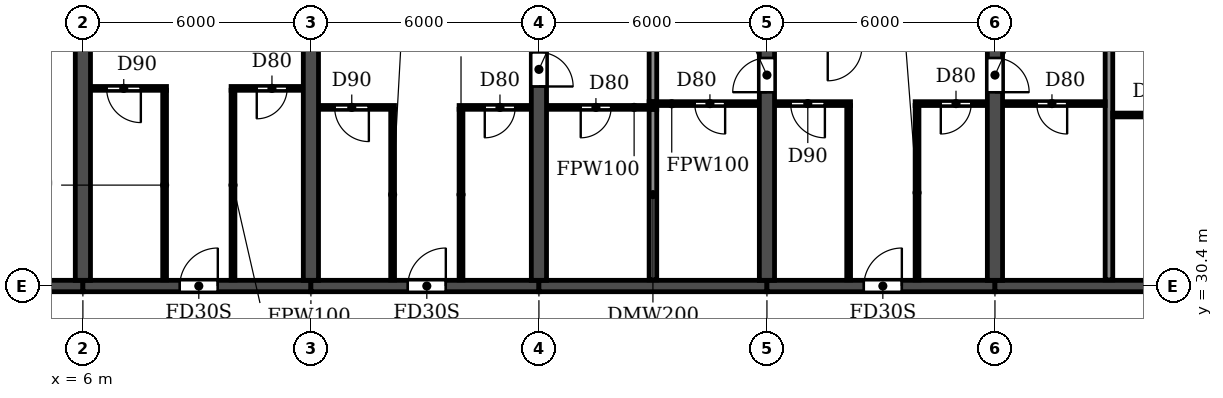
"""IFC4 building model, lengths in metres.
Left out: names, types, materials, properties, quantities, classifications, styles, units other than length and angle.
Written with IfcOpenShell. Run it as: python <this file> out.ifc"""

import sys

from ifc_helpers import new_model, si_unit, direction, frame, frame_2d, origin, place, context, subcontext, project, spatial, rectangle, extrude, element, fill, save


model = new_model("IFC4")
c1 = context("Model", 3, precision=1e-05, world=origin(), true_north=direction((0.0, 1.0)))
c2 = subcontext(c1, "Body", "Model", "MODEL_VIEW")
j1 = project(units=[si_unit("LENGTHUNIT", "METRE"), si_unit("PLANEANGLEUNIT", "RADIAN")], contexts=[c1])
p1 = place(None, origin())
s1 = spatial("IfcSite", under=j1, at=p1, CompositionType="ELEMENT")
p2 = place(p1, origin())
s2 = spatial("IfcBuilding", under=s1, at=p2, CompositionType="ELEMENT")
p3 = place(p2, frame((0.0, 0.0, 33.3)))
s3 = spatial("IfcBuildingStorey", under=s2, at=p3, CompositionType="ELEMENT", Elevation=33.3)
for number, where, z_axis, x_axis in (
    (1, (6.0, 30.55, 0.0), (0.0, 0.0, 1.0), (0.0, 1.0, 0.0)),
    (2, (12.0, 30.55, 0.0), (0.0, 0.0, 1.0), (0.0, 1.0, 0.0)),
):
    element("IfcWall", number, at=place(p3, frame(where, z_axis=z_axis, x_axis=x_axis)), inside=s3, PredefinedType="SHEAR", context=c2, shape_type="SweptSolid", body=[
        extrude(rectangle(XDim=14.05, YDim=0.4, at=frame_2d((7.025, 0.0))), origin(), (0.0, 0.0, 1.0), 3.05),
    ])
p4 = place(p3, frame((18.0, 30.55, 0.0), z_axis=(0.0, 0.0, 1.0), x_axis=(0.0, 1.0, 0.0)))
e3 = element("IfcWall", 3, at=p4, inside=s3, PredefinedType="SHEAR", context=c2, shape_type="SweptSolid", body=[
    extrude(rectangle(XDim=14.05, YDim=0.4, at=frame_2d((7.025, 0.0))), origin(), (0.0, 0.0, 1.0), 3.05),
])
p5 = place(p4, frame((5.1, 0.0, 0.0)))
e4 = element("IfcOpeningElement", 4, at=p5, cuts=e3, PredefinedType="OPENING", context=c2, shape_type="SweptSolid", body=[
    extrude(rectangle(XDim=0.9, YDim=2.1, at=frame_2d((0.45, 1.05))), frame((0.0, 0.21, 0.0), z_axis=(0.0, -1.0, 0.0), x_axis=(1.0, 0.0, 0.0)), (0.0, 0.0, 1.0), 0.42),
])
p6 = place(p3, frame((24.0, 30.55, 0.0), z_axis=(0.0, 0.0, 1.0), x_axis=(0.0, 1.0, 0.0)))
e5 = element("IfcWall", 5, at=p6, inside=s3, PredefinedType="SHEAR", context=c2, shape_type="SweptSolid", body=[
    extrude(rectangle(XDim=14.05, YDim=0.4, at=frame_2d((7.025, 0.0))), origin(), (0.0, 0.0, 1.0), 3.05),
])
p7 = place(p6, frame((4.95, 0.0, 0.0)))
e6 = element("IfcOpeningElement", 6, at=p7, cuts=e5, PredefinedType="OPENING", context=c2, shape_type="SweptSolid", body=[
    extrude(rectangle(XDim=0.9, YDim=2.1, at=frame_2d((0.45, 1.05))), frame((0.0, 0.21, 0.0), z_axis=(0.0, -1.0, 0.0), x_axis=(1.0, 0.0, 0.0)), (0.0, 0.0, 1.0), 0.42),
])
p8 = place(p3, frame((30.0, 30.55, 0.0), z_axis=(0.0, 0.0, 1.0), x_axis=(0.0, 1.0, 0.0)))
e7 = element("IfcWall", 7, at=p8, inside=s3, PredefinedType="SHEAR", context=c2, shape_type="SweptSolid", body=[
    extrude(rectangle(XDim=14.05, YDim=0.4, at=frame_2d((7.025, 0.0))), origin(), (0.0, 0.0, 1.0), 3.05),
])
p9 = place(p8, frame((4.95, 0.0, 0.0)))
e8 = element("IfcOpeningElement", 8, at=p9, cuts=e7, PredefinedType="OPENING", context=c2, shape_type="SweptSolid", body=[
    extrude(rectangle(XDim=0.9, YDim=2.1, at=frame_2d((0.45, 1.05))), frame((0.0, 0.21, 0.0), z_axis=(0.0, -1.0, 0.0), x_axis=(1.0, 0.0, 0.0)), (0.0, 0.0, 1.0), 0.42),
])
p10 = place(p3, frame((0.2, 30.4, 0.0), z_axis=(0.0, 0.0, 1.0), x_axis=(1.0, 0.0, 0.0)))
e9 = element("IfcWall", 9, at=p10, inside=s3, PredefinedType="SHEAR", context=c2, shape_type="SweptSolid", body=[
    extrude(rectangle(XDim=5.8, YDim=0.3, at=frame_2d((2.9, 0.0))), origin(), (0.0, 0.0, 1.0), 2.45),
])
p11 = place(p10, frame((2.3, 0.0, 0.0)))
e10 = element("IfcOpeningElement", 10, at=p11, cuts=e9, PredefinedType="OPENING", context=c2, shape_type="SweptSolid", body=[
    extrude(rectangle(XDim=1.0, YDim=2.1, at=frame_2d((0.5, 1.05))), frame((0.0, 0.16, 0.0), z_axis=(0.0, -1.0, 0.0), x_axis=(1.0, 0.0, 0.0)), (0.0, 0.0, 1.0), 0.32),
])
p12 = place(p3, frame((6.0, 30.4, 0.0), z_axis=(0.0, 0.0, 1.0), x_axis=(1.0, 0.0, 0.0)))
e11 = element("IfcWall", 11, at=p12, inside=s3, PredefinedType="SHEAR", context=c2, shape_type="SweptSolid", body=[
    extrude(rectangle(XDim=6.0, YDim=0.3, at=frame_2d((3.0, 0.0))), origin(), (0.0, 0.0, 1.0), 2.45),
])
p13 = place(p12, frame((2.55, 0.0, 0.0)))
e12 = element("IfcOpeningElement", 12, at=p13, cuts=e11, PredefinedType="OPENING", context=c2, shape_type="SweptSolid", body=[
    extrude(rectangle(XDim=1.0, YDim=2.1, at=frame_2d((0.5, 1.05))), frame((0.0, 0.16, 0.0), z_axis=(0.0, -1.0, 0.0), x_axis=(1.0, 0.0, 0.0)), (0.0, 0.0, 1.0), 0.32),
])
p14 = place(p3, frame((12.0, 30.4, 0.0), z_axis=(0.0, 0.0, 1.0), x_axis=(1.0, 0.0, 0.0)))
e13 = element("IfcWall", 13, at=p14, inside=s3, PredefinedType="SHEAR", context=c2, shape_type="SweptSolid", body=[
    extrude(rectangle(XDim=6.0, YDim=0.3, at=frame_2d((3.0, 0.0))), origin(), (0.0, 0.0, 1.0), 2.45),
])
p15 = place(p14, frame((2.55, 0.0, 0.0)))
e14 = element("IfcOpeningElement", 14, at=p15, cuts=e13, PredefinedType="OPENING", context=c2, shape_type="SweptSolid", body=[
    extrude(rectangle(XDim=1.0, YDim=2.1, at=frame_2d((0.5, 1.05))), frame((0.0, 0.16, 0.0), z_axis=(0.0, -1.0, 0.0), x_axis=(1.0, 0.0, 0.0)), (0.0, 0.0, 1.0), 0.32),
])
p16 = place(p3, frame((18.0, 30.4, 0.0), z_axis=(0.0, 0.0, 1.0), x_axis=(1.0, 0.0, 0.0)))
e15 = element("IfcWall", 15, at=p16, inside=s3, PredefinedType="SHEAR", context=c2, shape_type="SweptSolid", body=[
    extrude(rectangle(XDim=6.0, YDim=0.3, at=frame_2d((3.0, 0.0))), origin(), (0.0, 0.0, 1.0), 2.45),
])
p17 = place(p3, frame((24.0, 30.4, 0.0), z_axis=(0.0, 0.0, 1.0), x_axis=(1.0, 0.0, 0.0)))
e16 = element("IfcWall", 16, at=p17, inside=s3, PredefinedType="SHEAR", context=c2, shape_type="SweptSolid", body=[
    extrude(rectangle(XDim=6.0, YDim=0.3, at=frame_2d((3.0, 0.0))), origin(), (0.0, 0.0, 1.0), 2.45),
])
p18 = place(p17, frame((2.55, 0.0, 0.0)))
e17 = element("IfcOpeningElement", 17, at=p18, cuts=e16, PredefinedType="OPENING", context=c2, shape_type="SweptSolid", body=[
    extrude(rectangle(XDim=1.0, YDim=2.1, at=frame_2d((0.5, 1.05))), frame((0.0, 0.16, 0.0), z_axis=(0.0, -1.0, 0.0), x_axis=(1.0, 0.0, 0.0)), (0.0, 0.0, 1.0), 0.32),
])
p19 = place(p3, frame((30.0, 30.4, 0.0), z_axis=(0.0, 0.0, 1.0), x_axis=(1.0, 0.0, 0.0)))
e18 = element("IfcWall", 18, at=p19, inside=s3, PredefinedType="SHEAR", context=c2, shape_type="SweptSolid", body=[
    extrude(rectangle(XDim=6.0, YDim=0.3, at=frame_2d((3.0, 0.0))), origin(), (0.0, 0.0, 1.0), 2.45),
])
p20 = place(p3, frame((21.0, 30.56, 0.0), z_axis=(0.0, 0.0, 1.0), x_axis=(0.0, 1.0, 0.0)))
e19 = element("IfcWall", 19, at=p20, inside=s3, PredefinedType="PARTITIONING", context=c2, shape_type="SweptSolid", body=[
    extrude(rectangle(XDim=4.49, YDim=0.2, at=frame_2d((2.245, 0.0))), origin(), (0.0, 0.0, 1.0), 3.05),
])
p21 = place(p3, frame((21.0, 35.25, 0.0), z_axis=(0.0, 0.0, 1.0), x_axis=(0.0, 1.0, 0.0)))
e20 = element("IfcWall", 20, at=p21, inside=s3, PredefinedType="PARTITIONING", context=c2, shape_type="SweptSolid", body=[
    extrude(rectangle(XDim=9.49, YDim=0.2, at=frame_2d((4.745, 0.0))), origin(), (0.0, 0.0, 1.0), 3.05),
])
p22 = place(p3, frame((33.0, 30.56, 0.0), z_axis=(0.0, 0.0, 1.0), x_axis=(0.0, 1.0, 0.0)))
e21 = element("IfcWall", 21, at=p22, inside=s3, PredefinedType="PARTITIONING", context=c2, shape_type="SweptSolid", body=[
    extrude(rectangle(XDim=14.18, YDim=0.2, at=frame_2d((7.09, 0.0))), origin(), (0.0, 0.0, 1.0), 3.05),
])
p23 = place(p3, frame((33.1, 34.9, 0.0), z_axis=(0.0, 0.0, 1.0), x_axis=(1.0, 0.0, 0.0)))
e22 = element("IfcWall", 22, at=p23, inside=s3, PredefinedType="PARTITIONING", context=c2, shape_type="SweptSolid", body=[
    extrude(rectangle(XDim=2.69, YDim=0.1, at=frame_2d((1.345, 0.0))), origin(), (0.0, 0.0, 1.0), 3.05),
])
p24 = place(p23, frame((1.0, 0.0, 0.0)))
e23 = element("IfcOpeningElement", 23, at=p24, cuts=e22, PredefinedType="OPENING", context=c2, shape_type="SweptSolid", body=[
    extrude(rectangle(XDim=0.8, YDim=2.1, at=frame_2d((0.4, 1.05))), frame((0.0, 0.06, 0.0), z_axis=(0.0, -1.0, 0.0), x_axis=(1.0, 0.0, 0.0)), (0.0, 0.0, 1.0), 0.12),
])
p25 = place(p3, frame((12.21, 35.1, 0.0), z_axis=(0.0, 0.0, 1.0), x_axis=(1.0, 0.0, 0.0)))
e24 = element("IfcWall", 24, at=p25, inside=s3, PredefinedType="PARTITIONING", context=c2, shape_type="SweptSolid", body=[
    extrude(rectangle(XDim=1.99, YDim=0.1, at=frame_2d((0.995, 0.0))), origin(), (0.0, 0.0, 1.0), 3.05),
])
p26 = place(p25, frame((0.415, 0.0, 0.0)))
e25 = element("IfcOpeningElement", 25, at=p26, cuts=e24, PredefinedType="OPENING", context=c2, shape_type="SweptSolid", body=[
    extrude(rectangle(XDim=0.9, YDim=2.1, at=frame_2d((0.45, 1.05))), frame((0.0, 0.06, 0.0), z_axis=(0.0, -1.0, 0.0), x_axis=(1.0, 0.0, 0.0)), (0.0, 0.0, 1.0), 0.12),
])
p27 = place(p3, frame((15.9, 35.1, 0.0), z_axis=(0.0, 0.0, 1.0), x_axis=(1.0, 0.0, 0.0)))
e26 = element("IfcWall", 26, at=p27, inside=s3, PredefinedType="PARTITIONING", context=c2, shape_type="SweptSolid", body=[
    extrude(rectangle(XDim=1.89, YDim=0.1, at=frame_2d((0.945, 0.0))), origin(), (0.0, 0.0, 1.0), 3.05),
])
p28 = place(p27, frame((0.675, 0.0, 0.0)))
e27 = element("IfcOpeningElement", 27, at=p28, cuts=e26, PredefinedType="OPENING", context=c2, shape_type="SweptSolid", body=[
    extrude(rectangle(XDim=0.8, YDim=2.1, at=frame_2d((0.4, 1.05))), frame((0.0, 0.06, 0.0), z_axis=(0.0, -1.0, 0.0), x_axis=(1.0, 0.0, 0.0)), (0.0, 0.0, 1.0), 0.12),
])
p29 = place(p3, frame((18.21, 35.1, 0.0), z_axis=(0.0, 0.0, 1.0), x_axis=(1.0, 0.0, 0.0)))
e28 = element("IfcWall", 28, at=p29, inside=s3, PredefinedType="PARTITIONING", context=c2, shape_type="SweptSolid", body=[
    extrude(rectangle(XDim=2.89, YDim=0.1, at=frame_2d((1.445, 0.0))), origin(), (0.0, 0.0, 1.0), 3.05),
])
p30 = place(p29, frame((0.89, 0.0, 0.0)))
e29 = element("IfcOpeningElement", 29, at=p30, cuts=e28, PredefinedType="OPENING", context=c2, shape_type="SweptSolid", body=[
    extrude(rectangle(XDim=0.8, YDim=2.1, at=frame_2d((0.4, 1.05))), frame((0.0, 0.06, 0.0), z_axis=(0.0, -1.0, 0.0), x_axis=(1.0, 0.0, 0.0)), (0.0, 0.0, 1.0), 0.12),
])
p31 = place(p3, frame((20.9, 35.2, 0.0), z_axis=(0.0, 0.0, 1.0), x_axis=(1.0, 0.0, 0.0)))
e30 = element("IfcWall", 30, at=p31, inside=s3, PredefinedType="PARTITIONING", context=c2, shape_type="SweptSolid", body=[
    extrude(rectangle(XDim=2.89, YDim=0.1, at=frame_2d((1.445, 0.0))), origin(), (0.0, 0.0, 1.0), 3.05),
])
p32 = place(p31, frame((1.2, 0.0, 0.0)))
e31 = element("IfcOpeningElement", 31, at=p32, cuts=e30, PredefinedType="OPENING", context=c2, shape_type="SweptSolid", body=[
    extrude(rectangle(XDim=0.8, YDim=2.1, at=frame_2d((0.4, 1.05))), frame((0.0, 0.06, 0.0), z_axis=(0.0, -1.0, 0.0), x_axis=(1.0, 0.0, 0.0)), (0.0, 0.0, 1.0), 0.12),
])
p33 = place(p3, frame((24.21, 35.2, 0.0), z_axis=(0.0, 0.0, 1.0), x_axis=(1.0, 0.0, 0.0)))
e32 = element("IfcWall", 32, at=p33, inside=s3, PredefinedType="PARTITIONING", context=c2, shape_type="SweptSolid", body=[
    extrude(rectangle(XDim=1.99, YDim=0.1, at=frame_2d((0.995, 0.0))), origin(), (0.0, 0.0, 1.0), 3.05),
])
p34 = place(p33, frame((0.415, 0.0, 0.0)))
e33 = element("IfcOpeningElement", 33, at=p34, cuts=e32, PredefinedType="OPENING", context=c2, shape_type="SweptSolid", body=[
    extrude(rectangle(XDim=0.9, YDim=2.1, at=frame_2d((0.45, 1.05))), frame((0.0, 0.06, 0.0), z_axis=(0.0, -1.0, 0.0), x_axis=(1.0, 0.0, 0.0)), (0.0, 0.0, 1.0), 0.12),
])
p35 = place(p3, frame((27.9, 35.2, 0.0), z_axis=(0.0, 0.0, 1.0), x_axis=(1.0, 0.0, 0.0)))
e34 = element("IfcWall", 34, at=p35, inside=s3, PredefinedType="PARTITIONING", context=c2, shape_type="SweptSolid", body=[
    extrude(rectangle(XDim=1.89, YDim=0.1, at=frame_2d((0.945, 0.0))), origin(), (0.0, 0.0, 1.0), 3.05),
])
p36 = place(p35, frame((0.675, 0.0, 0.0)))
e35 = element("IfcOpeningElement", 35, at=p36, cuts=e34, PredefinedType="OPENING", context=c2, shape_type="SweptSolid", body=[
    extrude(rectangle(XDim=0.8, YDim=2.1, at=frame_2d((0.4, 1.05))), frame((0.0, 0.06, 0.0), z_axis=(0.0, -1.0, 0.0), x_axis=(1.0, 0.0, 0.0)), (0.0, 0.0, 1.0), 0.12),
])
p37 = place(p3, frame((30.21, 35.2, 0.0), z_axis=(0.0, 0.0, 1.0), x_axis=(1.0, 0.0, 0.0)))
e36 = element("IfcWall", 36, at=p37, inside=s3, PredefinedType="PARTITIONING", context=c2, shape_type="SweptSolid", body=[
    extrude(rectangle(XDim=2.69, YDim=0.1, at=frame_2d((1.345, 0.0))), origin(), (0.0, 0.0, 1.0), 3.05),
])
p38 = place(p37, frame((0.89, 0.0, 0.0)))
e37 = element("IfcOpeningElement", 37, at=p38, cuts=e36, PredefinedType="OPENING", context=c2, shape_type="SweptSolid", body=[
    extrude(rectangle(XDim=0.8, YDim=2.1, at=frame_2d((0.4, 1.05))), frame((0.0, 0.06, 0.0), z_axis=(0.0, -1.0, 0.0), x_axis=(1.0, 0.0, 0.0)), (0.0, 0.0, 1.0), 0.12),
])
p39 = place(p3, frame((6.21, 35.6, 0.0), z_axis=(0.0, 0.0, 1.0), x_axis=(1.0, 0.0, 0.0)))
e38 = element("IfcWall", 38, at=p39, inside=s3, PredefinedType="PARTITIONING", context=c2, shape_type="SweptSolid", body=[
    extrude(rectangle(XDim=1.99, YDim=0.1, at=frame_2d((0.995, 0.0))), origin(), (0.0, 0.0, 1.0), 3.05),
])
p40 = place(p39, frame((0.415, 0.0, 0.0)))
e39 = element("IfcOpeningElement", 39, at=p40, cuts=e38, PredefinedType="OPENING", context=c2, shape_type="SweptSolid", body=[
    extrude(rectangle(XDim=0.9, YDim=2.1, at=frame_2d((0.45, 1.05))), frame((0.0, 0.06, 0.0), z_axis=(0.0, -1.0, 0.0), x_axis=(1.0, 0.0, 0.0)), (0.0, 0.0, 1.0), 0.12),
])
p41 = place(p3, frame((9.9, 35.6, 0.0), z_axis=(0.0, 0.0, 1.0), x_axis=(1.0, 0.0, 0.0)))
e40 = element("IfcWall", 40, at=p41, inside=s3, PredefinedType="PARTITIONING", context=c2, shape_type="SweptSolid", body=[
    extrude(rectangle(XDim=1.89, YDim=0.1, at=frame_2d((0.945, 0.0))), origin(), (0.0, 0.0, 1.0), 3.05),
])
p42 = place(p41, frame((0.675, 0.0, 0.0)))
e41 = element("IfcOpeningElement", 41, at=p42, cuts=e40, PredefinedType="OPENING", context=c2, shape_type="SweptSolid", body=[
    extrude(rectangle(XDim=0.8, YDim=2.1, at=frame_2d((0.4, 1.05))), frame((0.0, 0.06, 0.0), z_axis=(0.0, -1.0, 0.0), x_axis=(1.0, 0.0, 0.0)), (0.0, 0.0, 1.0), 0.12),
])
for number, where, z_axis, x_axis in (
    (42, (8.15, 30.56, 0.0), (0.0, 0.0, 1.0), (0.0, 1.0, 0.0)),
    (43, (9.95, 30.56, 0.0), (0.0, 0.0, 1.0), (0.0, 1.0, 0.0)),
):
    element("IfcWall", number, at=place(p3, frame(where, z_axis=z_axis, x_axis=x_axis)), inside=s3, PredefinedType="PARTITIONING", context=c2, shape_type="SweptSolid", body=[
        extrude(rectangle(XDim=4.99, YDim=0.1, at=frame_2d((2.495, 0.0))), origin(), (0.0, 0.0, 1.0), 3.05),
    ])
for number, where, z_axis, x_axis in (
    (44, (14.15, 30.56, 0.0), (0.0, 0.0, 1.0), (0.0, 1.0, 0.0)),
    (45, (15.95, 30.56, 0.0), (0.0, 0.0, 1.0), (0.0, 1.0, 0.0)),
):
    element("IfcWall", number, at=place(p3, frame(where, z_axis=z_axis, x_axis=x_axis)), inside=s3, PredefinedType="PARTITIONING", context=c2, shape_type="SweptSolid", body=[
        extrude(rectangle(XDim=4.49, YDim=0.1, at=frame_2d((2.245, 0.0))), origin(), (0.0, 0.0, 1.0), 3.05),
    ])
for number, where, z_axis, x_axis in (
    (46, (26.15, 30.56, 0.0), (0.0, 0.0, 1.0), (0.0, 1.0, 0.0)),
    (47, (27.95, 30.56, 0.0), (0.0, 0.0, 1.0), (0.0, 1.0, 0.0)),
):
    element("IfcWall", number, at=place(p3, frame(where, z_axis=z_axis, x_axis=x_axis)), inside=s3, PredefinedType="PARTITIONING", context=c2, shape_type="SweptSolid", body=[
        extrude(rectangle(XDim=4.59, YDim=0.1, at=frame_2d((2.295, 0.0))), origin(), (0.0, 0.0, 1.0), 3.05),
    ])
p43 = place(p40, frame((0.9, 0.0, 0.0), z_axis=(0.0, 0.0, 1.0), x_axis=(-1.0, 0.0, 0.0)))
e48 = element("IfcDoor", 48, at=p43, inside=s3, OperationType="SINGLE_SWING_LEFT", PredefinedType="DOOR", context=c2, shape_type="SweptSolid", body=[
    extrude(rectangle(XDim=0.9, YDim=2.1, at=frame_2d((0.45, 1.05))), frame((0.0, 0.025, 0.0), z_axis=(0.0, -1.0, 0.0), x_axis=(1.0, 0.0, 0.0)), (0.0, 0.0, 1.0), 0.05),
])
fill(e39, e48)
p44 = place(p13, origin())
e49 = element("IfcDoor", 49, at=p44, inside=s3, OperationType="SINGLE_SWING_RIGHT", PredefinedType="DOOR", context=c2, shape_type="SweptSolid", body=[
    extrude(rectangle(XDim=1.0, YDim=2.1, at=frame_2d((0.5, 1.05))), frame((0.0, 0.025, 0.0), z_axis=(0.0, -1.0, 0.0), x_axis=(1.0, 0.0, 0.0)), (0.0, 0.0, 1.0), 0.05),
])
fill(e12, e49)
p45 = place(p42, frame((0.8, 0.0, 0.0), z_axis=(0.0, 0.0, 1.0), x_axis=(-1.0, 0.0, 0.0)))
e50 = element("IfcDoor", 50, at=p45, inside=s3, OperationType="SINGLE_SWING_RIGHT", PredefinedType="DOOR", context=c2, shape_type="SweptSolid", body=[
    extrude(rectangle(XDim=0.8, YDim=2.1, at=frame_2d((0.4, 1.05))), frame((0.0, 0.025, 0.0), z_axis=(0.0, -1.0, 0.0), x_axis=(1.0, 0.0, 0.0)), (0.0, 0.0, 1.0), 0.05),
])
fill(e41, e50)
p46 = place(p30, frame((0.8, 0.0, 0.0), z_axis=(0.0, 0.0, 1.0), x_axis=(-1.0, 0.0, 0.0)))
e51 = element("IfcDoor", 51, at=p46, inside=s3, OperationType="SINGLE_SWING_RIGHT", PredefinedType="DOOR", context=c2, shape_type="SweptSolid", body=[
    extrude(rectangle(XDim=0.8, YDim=2.1, at=frame_2d((0.4, 1.05))), frame((0.0, 0.025, 0.0), z_axis=(0.0, -1.0, 0.0), x_axis=(1.0, 0.0, 0.0)), (0.0, 0.0, 1.0), 0.05),
])
fill(e29, e51)
p47 = place(p26, frame((0.9, 0.0, 0.0), z_axis=(0.0, 0.0, 1.0), x_axis=(-1.0, 0.0, 0.0)))
e52 = element("IfcDoor", 52, at=p47, inside=s3, OperationType="SINGLE_SWING_LEFT", PredefinedType="DOOR", context=c2, shape_type="SweptSolid", body=[
    extrude(rectangle(XDim=0.9, YDim=2.1, at=frame_2d((0.45, 1.05))), frame((0.0, 0.025, 0.0), z_axis=(0.0, -1.0, 0.0), x_axis=(1.0, 0.0, 0.0)), (0.0, 0.0, 1.0), 0.05),
])
fill(e25, e52)
p48 = place(p15, origin())
e53 = element("IfcDoor", 53, at=p48, inside=s3, OperationType="SINGLE_SWING_RIGHT", PredefinedType="DOOR", context=c2, shape_type="SweptSolid", body=[
    extrude(rectangle(XDim=1.0, YDim=2.1, at=frame_2d((0.5, 1.05))), frame((0.0, 0.025, 0.0), z_axis=(0.0, -1.0, 0.0), x_axis=(1.0, 0.0, 0.0)), (0.0, 0.0, 1.0), 0.05),
])
fill(e14, e53)
p49 = place(p28, frame((0.8, 0.0, 0.0), z_axis=(0.0, 0.0, 1.0), x_axis=(-1.0, 0.0, 0.0)))
e54 = element("IfcDoor", 54, at=p49, inside=s3, OperationType="SINGLE_SWING_RIGHT", PredefinedType="DOOR", context=c2, shape_type="SweptSolid", body=[
    extrude(rectangle(XDim=0.8, YDim=2.1, at=frame_2d((0.4, 1.05))), frame((0.0, 0.025, 0.0), z_axis=(0.0, -1.0, 0.0), x_axis=(1.0, 0.0, 0.0)), (0.0, 0.0, 1.0), 0.05),
])
fill(e27, e54)
p50 = place(p5, frame((0.9, 0.0, 0.0), z_axis=(0.0, 0.0, 1.0), x_axis=(-1.0, 0.0, 0.0)))
e55 = element("IfcDoor", 55, at=p50, inside=s3, OperationType="SINGLE_SWING_RIGHT", PredefinedType="DOOR", context=c2, shape_type="SweptSolid", body=[
    extrude(rectangle(XDim=0.9, YDim=2.1, at=frame_2d((0.45, 1.05))), frame((0.0, 0.025, 0.0), z_axis=(0.0, -1.0, 0.0), x_axis=(1.0, 0.0, 0.0)), (0.0, 0.0, 1.0), 0.05),
])
fill(e4, e55)
p51 = place(p32, frame((0.8, 0.0, 0.0), z_axis=(0.0, 0.0, 1.0), x_axis=(-1.0, 0.0, 0.0)))
e56 = element("IfcDoor", 56, at=p51, inside=s3, OperationType="SINGLE_SWING_LEFT", PredefinedType="DOOR", context=c2, shape_type="SweptSolid", body=[
    extrude(rectangle(XDim=0.8, YDim=2.1, at=frame_2d((0.4, 1.05))), frame((0.0, 0.025, 0.0), z_axis=(0.0, -1.0, 0.0), x_axis=(1.0, 0.0, 0.0)), (0.0, 0.0, 1.0), 0.05),
])
fill(e31, e56)
p52 = place(p38, frame((0.8, 0.0, 0.0), z_axis=(0.0, 0.0, 1.0), x_axis=(-1.0, 0.0, 0.0)))
e57 = element("IfcDoor", 57, at=p52, inside=s3, OperationType="SINGLE_SWING_LEFT", PredefinedType="DOOR", context=c2, shape_type="SweptSolid", body=[
    extrude(rectangle(XDim=0.8, YDim=2.1, at=frame_2d((0.4, 1.05))), frame((0.0, 0.025, 0.0), z_axis=(0.0, -1.0, 0.0), x_axis=(1.0, 0.0, 0.0)), (0.0, 0.0, 1.0), 0.05),
])
fill(e37, e57)
p53 = place(p7, origin())
e58 = element("IfcDoor", 58, at=p53, inside=s3, OperationType="SINGLE_SWING_LEFT", PredefinedType="DOOR", context=c2, shape_type="SweptSolid", body=[
    extrude(rectangle(XDim=0.9, YDim=2.1, at=frame_2d((0.45, 1.05))), frame((0.0, 0.025, 0.0), z_axis=(0.0, -1.0, 0.0), x_axis=(1.0, 0.0, 0.0)), (0.0, 0.0, 1.0), 0.05),
])
fill(e6, e58)
p54 = place(p34, frame((0.9, 0.0, 0.0), z_axis=(0.0, 0.0, 1.0), x_axis=(-1.0, 0.0, 0.0)))
e59 = element("IfcDoor", 59, at=p54, inside=s3, OperationType="SINGLE_SWING_LEFT", PredefinedType="DOOR", context=c2, shape_type="SweptSolid", body=[
    extrude(rectangle(XDim=0.9, YDim=2.1, at=frame_2d((0.45, 1.05))), frame((0.0, 0.025, 0.0), z_axis=(0.0, -1.0, 0.0), x_axis=(1.0, 0.0, 0.0)), (0.0, 0.0, 1.0), 0.05),
])
fill(e33, e59)
p55 = place(p18, origin())
e60 = element("IfcDoor", 60, at=p55, inside=s3, OperationType="SINGLE_SWING_RIGHT", PredefinedType="DOOR", context=c2, shape_type="SweptSolid", body=[
    extrude(rectangle(XDim=1.0, YDim=2.1, at=frame_2d((0.5, 1.05))), frame((0.0, 0.025, 0.0), z_axis=(0.0, -1.0, 0.0), x_axis=(1.0, 0.0, 0.0)), (0.0, 0.0, 1.0), 0.05),
])
fill(e17, e60)
p56 = place(p36, frame((0.8, 0.0, 0.0), z_axis=(0.0, 0.0, 1.0), x_axis=(-1.0, 0.0, 0.0)))
e61 = element("IfcDoor", 61, at=p56, inside=s3, OperationType="SINGLE_SWING_RIGHT", PredefinedType="DOOR", context=c2, shape_type="SweptSolid", body=[
    extrude(rectangle(XDim=0.8, YDim=2.1, at=frame_2d((0.4, 1.05))), frame((0.0, 0.025, 0.0), z_axis=(0.0, -1.0, 0.0), x_axis=(1.0, 0.0, 0.0)), (0.0, 0.0, 1.0), 0.05),
])
fill(e35, e61)
p57 = place(p9, frame((0.9, 0.0, 0.0), z_axis=(0.0, 0.0, 1.0), x_axis=(-1.0, 0.0, 0.0)))
e62 = element("IfcDoor", 62, at=p57, inside=s3, OperationType="SINGLE_SWING_RIGHT", PredefinedType="DOOR", context=c2, shape_type="SweptSolid", body=[
    extrude(rectangle(XDim=0.9, YDim=2.1, at=frame_2d((0.45, 1.05))), frame((0.0, 0.025, 0.0), z_axis=(0.0, -1.0, 0.0), x_axis=(1.0, 0.0, 0.0)), (0.0, 0.0, 1.0), 0.05),
])
fill(e8, e62)
save(model, sys.argv[1])
